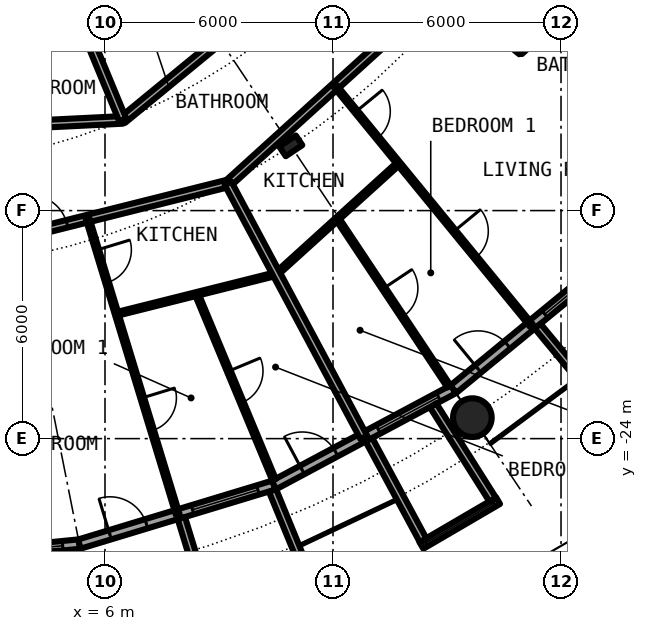
"""IFC4 building model, lengths in metres.
Left out: names, types, materials, properties, quantities, classifications, styles, units other than length and angle.
Written with IfcOpenShell. Run it as: python <this file> out.ifc"""

import sys

from ifc_helpers import new_model, si_unit, direction, frame, frame_2d, origin, origin_2d, place, context, subcontext, project, spatial, rectangle, circle, hollow_circle, i_section, extrude, element, fill, save


model = new_model("IFC4")
c1 = context("Model", 3, precision=1e-05, world=origin(), true_north=direction((0.0, 1.0)))
c2 = subcontext(c1, "Body", "Model", "MODEL_VIEW")
j1 = project(units=[si_unit("LENGTHUNIT", "METRE"), si_unit("PLANEANGLEUNIT", "RADIAN")], contexts=[c1])
p1 = place(None, origin())
s1 = spatial("IfcSite", under=j1, at=p1, CompositionType="ELEMENT")
p2 = place(p1, origin())
s2 = spatial("IfcBuilding", under=s1, at=p2, CompositionType="ELEMENT")
p3 = place(p2, frame((0.0, 0.0, 81.9)))
s3 = spatial("IfcBuildingStorey", under=s2, at=p3, CompositionType="ELEMENT", Elevation=81.9)
p4 = place(p3, frame((15.667, -23.448, 0.0), z_axis=(0.0, 0.0, 1.0), x_axis=(1.0, 0.0, 0.0)))
e1 = element("IfcColumn", 1, at=p4, inside=s3, PredefinedType="COLUMN", context=c2, shape_type="SweptSolid", body=[
    extrude(hollow_circle(Radius=0.508, WallThickness=0.04, at=origin_2d()), origin(), (0.0, 0.0, 1.0), 3.05),
])
p5 = place(p3, frame((10.889, -16.297, 0.0), z_axis=(0.0, 0.0, 1.0), x_axis=(0.55557023302, -0.831469612303, 0.0)))
e2 = element("IfcColumn", 2, at=p5, inside=s3, PredefinedType="COLUMN", context=c2, shape_type="SweptSolid", body=[
    extrude(i_section(OverallWidth=0.306, OverallDepth=0.524, WebThickness=0.021, FlangeThickness=0.04, FilletRadius=0.027, at=origin_2d()), origin(), (0.0, 0.0, 1.0), 3.05),
])
p6 = place(p3, frame((0.0, -27.3, 0.0), z_axis=(0.0, 0.0, 1.0), x_axis=(0.995173996315, 0.098126026407, 0.0)))
e3 = element("IfcWall", 3, at=p6, inside=s3, PredefinedType="SOLIDWALL", context=c2, shape_type="SweptSolid", body=[
    extrude(rectangle(XDim=5.352, YDim=0.25, at=frame_2d((2.676, 0.0))), origin(), (0.0, 0.0, 1.0), 2.7),
])
p7 = place(p6, frame((0.841, 0.0, 0.0)))
e4 = element("IfcOpeningElement", 4, at=p7, cuts=e3, PredefinedType="OPENING", context=c2, shape_type="SweptSolid", body=[
    extrude(rectangle(XDim=1.0, YDim=2.2, at=frame_2d((0.5, 1.1))), frame((0.0, 0.135, 0.0), z_axis=(0.0, -1.0, 0.0), x_axis=(1.0, 0.0, 0.0)), (0.0, 0.0, 1.0), 0.27),
])
p8 = place(p6, frame((3.111, 0.0, 0.3)))
e5 = element("IfcOpeningElement", 5, at=p8, cuts=e3, PredefinedType="OPENING", context=c2, shape_type="SweptSolid", body=[
    extrude(rectangle(XDim=1.8, YDim=2.1, at=frame_2d((0.9, 1.05))), frame((0.0, 0.135, 0.0), z_axis=(0.0, -1.0, 0.0), x_axis=(1.0, 0.0, 0.0)), (0.0, 0.0, 1.0), 0.27),
])
p9 = place(p3, frame((4.671, -26.966, -0.03), z_axis=(0.0, 0.0, 1.0), x_axis=(0.170539878907, -0.985350774954, 0.0)))
e6 = element("IfcWall", 6, at=p9, inside=s3, PredefinedType="SOLIDWALL", context=c2, shape_type="SweptSolid", body=[
    extrude(rectangle(XDim=2.932, YDim=0.2, at=frame_2d((1.466, 0.0))), origin(), (0.0, 0.0, 1.0), 2.73),
])
p10 = place(p3, frame((5.326, -26.775, 0.0), z_axis=(0.0, 0.0, 1.0), x_axis=(0.956965678721, 0.290201119486, 0.0)))
e7 = element("IfcWall", 7, at=p10, inside=s3, PredefinedType="SOLIDWALL", context=c2, shape_type="SweptSolid", body=[
    extrude(rectangle(XDim=5.351, YDim=0.25, at=frame_2d((2.676, 0.0))), origin(), (0.0, 0.0, 1.0), 2.7),
])
p11 = place(p10, frame((0.841, 0.0, 0.0)))
e8 = element("IfcOpeningElement", 8, at=p11, cuts=e7, PredefinedType="OPENING", context=c2, shape_type="SweptSolid", body=[
    extrude(rectangle(XDim=1.0, YDim=2.2, at=frame_2d((0.5, 1.1))), frame((0.0, 0.135, 0.0), z_axis=(0.0, -1.0, 0.0), x_axis=(1.0, 0.0, 0.0)), (0.0, 0.0, 1.0), 0.27),
])
p12 = place(p10, frame((3.111, 0.0, 0.3)))
e9 = element("IfcOpeningElement", 9, at=p12, cuts=e7, PredefinedType="OPENING", context=c2, shape_type="SweptSolid", body=[
    extrude(rectangle(XDim=1.8, YDim=2.1, at=frame_2d((0.9, 1.05))), frame((0.0, 0.135, 0.0), z_axis=(0.0, -1.0, 0.0), x_axis=(1.0, 0.0, 0.0)), (0.0, 0.0, 1.0), 0.27),
])
p13 = place(p3, frame((8.009, -26.092, -0.03), z_axis=(0.0, 0.0, 1.0), x_axis=(0.293406695073, -0.955987715029, 0.0)))
e10 = element("IfcWall", 10, at=p13, inside=s3, PredefinedType="SOLIDWALL", context=c2, shape_type="SweptSolid", body=[
    extrude(rectangle(XDim=3.006, YDim=0.2, at=frame_2d((1.503, 0.0))), origin(), (0.0, 0.0, 1.0), 2.73),
])
p14 = place(p3, frame((10.409, -25.364, -0.03), z_axis=(0.0, 0.0, 1.0), x_axis=(0.379509886562, -0.925187681501, 0.0)))
e11 = element("IfcWall", 11, at=p14, inside=s3, PredefinedType="SOLIDWALL", context=c2, shape_type="SweptSolid", body=[
    extrude(rectangle(XDim=2.883, YDim=0.2, at=frame_2d((1.441, 0.0))), origin(), (0.0, 0.0, 1.0), 2.73),
])
p15 = place(p3, frame((10.447, -25.222, 0.0), z_axis=(0.0, 0.0, 1.0), x_axis=(0.881915646801, 0.471407246368, 0.0)))
e12 = element("IfcWall", 12, at=p15, inside=s3, PredefinedType="SOLIDWALL", context=c2, shape_type="SweptSolid", body=[
    extrude(rectangle(XDim=5.352, YDim=0.25, at=frame_2d((2.676, 0.0))), origin(), (0.0, 0.0, 1.0), 2.7),
])
p16 = place(p15, frame((0.841, 0.0, 0.0)))
e13 = element("IfcOpeningElement", 13, at=p16, cuts=e12, PredefinedType="OPENING", context=c2, shape_type="SweptSolid", body=[
    extrude(rectangle(XDim=1.0, YDim=2.2, at=frame_2d((0.5, 1.1))), frame((0.0, 0.135, 0.0), z_axis=(0.0, -1.0, 0.0), x_axis=(1.0, 0.0, 0.0)), (0.0, 0.0, 1.0), 0.27),
])
p17 = place(p15, frame((3.111, 0.0, 0.3)))
e14 = element("IfcOpeningElement", 14, at=p17, cuts=e12, PredefinedType="OPENING", context=c2, shape_type="SweptSolid", body=[
    extrude(rectangle(XDim=1.8, YDim=2.1, at=frame_2d((0.9, 1.05))), frame((0.0, 0.135, 0.0), z_axis=(0.0, -1.0, 0.0), x_axis=(1.0, 0.0, 0.0)), (0.0, 0.0, 1.0), 0.27),
])
p18 = place(p3, frame((14.327, -26.812, -0.03), z_axis=(0.0, 0.0, 1.0), x_axis=(0.863346521872, 0.504611517081, 0.0)))
e15 = element("IfcWall", 15, at=p18, inside=s3, PredefinedType="SOLIDWALL", context=c2, shape_type="SweptSolid", body=[
    extrude(rectangle(XDim=2.336, YDim=0.2, at=frame_2d((1.168, 0.0))), origin(), (0.0, 0.0, 1.0), 2.73),
])
p19 = place(p18, frame((0.128, 0.0, 0.33)))
e16 = element("IfcOpeningElement", 16, at=p19, cuts=e15, PredefinedType="OPENING", context=c2, shape_type="SweptSolid", body=[
    extrude(circle(Radius=1.04, at=frame_2d((1.04, 1.04))), frame((0.0, 0.11, 0.0), z_axis=(0.0, -1.0, 0.0), x_axis=(1.0, 0.0, 0.0)), (0.0, 0.0, 1.0), 0.22),
])
p20 = place(p3, frame((12.945, -24.029, -0.03), z_axis=(0.0, 0.0, 1.0), x_axis=(0.474424310775, -0.88029629861, 0.0)))
e17 = element("IfcWall", 17, at=p20, inside=s3, PredefinedType="SOLIDWALL", context=c2, shape_type="SweptSolid", body=[
    extrude(rectangle(XDim=3.006, YDim=0.2, at=frame_2d((1.503, 0.0))), origin(), (0.0, 0.0, 1.0), 2.73),
])
p21 = place(p3, frame((14.635, -23.126, -0.03), z_axis=(0.0, 0.0, 1.0), x_axis=(0.534437802731, -0.845207805816, 0.0)))
e18 = element("IfcWall", 18, at=p21, inside=s3, PredefinedType="SOLIDWALL", context=c2, shape_type="SweptSolid", body=[
    extrude(rectangle(XDim=2.932, YDim=0.2, at=frame_2d((1.466, 0.0))), origin(), (0.0, 0.0, 1.0), 2.73),
])
p22 = place(p3, frame((15.167, -22.699, 0.0), z_axis=(0.0, 0.0, 1.0), x_axis=(0.773019449054, 0.634382322723, 0.0)))
e19 = element("IfcWall", 19, at=p22, inside=s3, PredefinedType="SOLIDWALL", context=c2, shape_type="SweptSolid", body=[
    extrude(rectangle(XDim=5.352, YDim=0.25, at=frame_2d((2.676, 0.0))), origin(), (0.0, 0.0, 1.0), 2.7),
])
p23 = place(p22, frame((0.841, 0.0, 0.0)))
e20 = element("IfcOpeningElement", 20, at=p23, cuts=e19, PredefinedType="OPENING", context=c2, shape_type="SweptSolid", body=[
    extrude(rectangle(XDim=1.0, YDim=2.2, at=frame_2d((0.5, 1.1))), frame((0.0, 0.135, 0.0), z_axis=(0.0, -1.0, 0.0), x_axis=(1.0, 0.0, 0.0)), (0.0, 0.0, 1.0), 0.27),
])
p24 = place(p22, frame((3.111, 0.0, 0.3)))
e21 = element("IfcOpeningElement", 21, at=p24, cuts=e19, PredefinedType="OPENING", context=c2, shape_type="SweptSolid", body=[
    extrude(rectangle(XDim=1.8, YDim=2.1, at=frame_2d((0.9, 1.05))), frame((0.0, 0.135, 0.0), z_axis=(0.0, -1.0, 0.0), x_axis=(1.0, 0.0, 0.0)), (0.0, 0.0, 1.0), 0.27),
])
p25 = place(p3, frame((17.384, -21.041, -0.03), z_axis=(0.0, 0.0, 1.0), x_axis=(0.63709551667, -0.770784861449, 0.0)))
e22 = element("IfcWall", 22, at=p25, inside=s3, PredefinedType="SOLIDWALL", context=c2, shape_type="SweptSolid", body=[
    extrude(rectangle(XDim=3.006, YDim=0.2, at=frame_2d((1.503, 0.0))), origin(), (0.0, 0.0, 1.0), 2.73),
])
p26 = place(p3, frame((6.303, -20.721, 0.0), z_axis=(0.0, 0.0, 1.0), x_axis=(0.97005315629, 0.242892721118, 0.0)))
e23 = element("IfcWall", 23, at=p26, inside=s3, PredefinedType="PARTITIONING", context=c2, shape_type="SweptSolid", body=[
    extrude(rectangle(XDim=4.343, YDim=0.1, at=frame_2d((2.172, 0.0))), origin(), (0.0, 0.0, 1.0), 2.7),
])
p27 = place(p3, frame((10.513, -19.668, 0.0), z_axis=(0.0, 0.0, 1.0), x_axis=(0.74092137325, 0.671591779775, 0.0)))
e24 = element("IfcWall", 24, at=p27, inside=s3, PredefinedType="PARTITIONING", context=c2, shape_type="SweptSolid", body=[
    extrude(rectangle(XDim=4.342, YDim=0.1, at=frame_2d((2.171, 0.0))), origin(), (0.0, 0.0, 1.0), 2.7),
])
p28 = place(p3, frame((16.936, -13.845, 0.0), z_axis=(0.0, 0.0, 1.0), x_axis=(0.740836325503, 0.671685595212, 0.0)))
e25 = element("IfcWall", 25, at=p28, inside=s3, PredefinedType="PARTITIONING", context=c2, shape_type="SweptSolid", body=[
    extrude(rectangle(XDim=2.168, YDim=0.1, at=frame_2d((1.084, 0.0))), origin(), (0.0, 0.0, 1.0), 2.7),
])
p29 = place(p3, frame((0.0, -19.6, 0.0), z_axis=(0.0, 0.0, 1.0), x_axis=(0.970002158938, 0.243096301198, 0.0)))
e26 = element("IfcWall", 26, at=p29, inside=s3, PredefinedType="PARTITIONING", context=c2, shape_type="SweptSolid", body=[
    extrude(rectangle(XDim=9.528, YDim=0.2, at=frame_2d((4.764, 0.0))), origin(), (0.0, 0.0, 1.0), 2.38),
])
p30 = place(p29, frame((4.155, 0.0, 0.0)))
e27 = element("IfcOpeningElement", 27, at=p30, cuts=e26, PredefinedType="OPENING", context=c2, shape_type="SweptSolid", body=[
    extrude(rectangle(XDim=1.0, YDim=2.3, at=frame_2d((0.5, 1.15))), frame((0.0, 0.11, 0.0), z_axis=(0.0, -1.0, 0.0), x_axis=(1.0, 0.0, 0.0)), (0.0, 0.0, 1.0), 0.22),
])
p31 = place(p3, frame((9.239, -17.286, 0.0), z_axis=(0.0, 0.0, 1.0), x_axis=(0.740909940942, 0.671604392044, 0.0)))
e28 = element("IfcWall", 28, at=p31, inside=s3, PredefinedType="PARTITIONING", context=c2, shape_type="SweptSolid", body=[
    extrude(rectangle(XDim=9.367, YDim=0.2, at=frame_2d((4.683, 0.0))), origin(), (0.0, 0.0, 1.0), 2.38),
])
p32 = place(p31, frame((5.215, 0.0, 0.0)))
e29 = element("IfcOpeningElement", 29, at=p32, cuts=e28, PredefinedType="OPENING", context=c2, shape_type="SweptSolid", body=[
    extrude(rectangle(XDim=1.0, YDim=2.3, at=frame_2d((0.5, 1.15))), frame((0.0, 0.11, 0.0), z_axis=(0.0, -1.0, 0.0), x_axis=(1.0, 0.0, 0.0)), (0.0, 0.0, 1.0), 0.22),
])
p33 = place(p3, frame((6.467, -15.614, 0.0), z_axis=(0.0, 0.0, 1.0), x_axis=(0.773074935257, 0.634314704605, 0.0)))
e30 = element("IfcWall", 30, at=p33, inside=s3, PredefinedType="PARTITIONING", context=c2, shape_type="SweptSolid", body=[
    extrude(rectangle(XDim=9.809, YDim=0.2, at=frame_2d((4.904, 0.0))), origin(), (0.0, 0.0, 1.0), 2.7),
])
p34 = place(p33, frame((4.407, 0.0, 0.0)))
e31 = element("IfcOpeningElement", 31, at=p34, cuts=e30, PredefinedType="OPENING", context=c2, shape_type="SweptSolid", body=[
    extrude(rectangle(XDim=1.0, YDim=2.3, at=frame_2d((0.5, 1.15))), frame((0.0, 0.11, 0.0), z_axis=(0.0, -1.0, 0.0), x_axis=(1.0, 0.0, 0.0)), (0.0, 0.0, 1.0), 0.22),
])
p35 = place(p3, frame((-4.906, -16.172, 0.0), z_axis=(0.0, 0.0, 1.0), x_axis=(0.998798520108, 0.049005267363, 0.0)))
e32 = element("IfcWall", 32, at=p35, inside=s3, PredefinedType="PARTITIONING", context=c2, shape_type="SweptSolid", body=[
    extrude(rectangle(XDim=11.389, YDim=0.2, at=frame_2d((5.694, 0.0))), origin(), (0.0, 0.0, 1.0), 2.7),
])
p36 = place(p35, frame((6.008, 0.0, 0.0)))
e33 = element("IfcOpeningElement", 33, at=p36, cuts=e32, PredefinedType="OPENING", context=c2, shape_type="SweptSolid", body=[
    extrude(rectangle(XDim=1.0, YDim=2.3, at=frame_2d((0.5, 1.15))), frame((0.0, 0.11, 0.0), z_axis=(0.0, -1.0, 0.0), x_axis=(1.0, 0.0, 0.0)), (0.0, 0.0, 1.0), 0.22),
])
p37 = place(p3, frame((2.954, -7.132, 0.0), z_axis=(0.0, 0.0, 1.0), x_axis=(0.382646942224, -0.923894646378, 0.0)))
e34 = element("IfcWall", 34, at=p37, inside=s3, PredefinedType="PARTITIONING", context=c2, shape_type="SweptSolid", body=[
    extrude(rectangle(XDim=9.181, YDim=0.2, at=frame_2d((4.59, 0.0))), origin(), (0.0, 0.0, 1.0), 2.7),
])
p38 = place(p3, frame((5.543, -18.211, 0.0), z_axis=(0.0, 0.0, 1.0), x_axis=(0.291319167605, -0.956625915698, 0.0)))
e35 = element("IfcWall", 35, at=p38, inside=s3, PredefinedType="PARTITIONING", context=c2, shape_type="SweptSolid", body=[
    extrude(rectangle(XDim=8.139, YDim=0.1, at=frame_2d((4.07, 0.0))), origin(), (0.0, 0.0, 1.0), 2.7),
])
p39 = place(p38, frame((0.862, 0.0, 0.0)))
e36 = element("IfcOpeningElement", 36, at=p39, cuts=e35, PredefinedType="OPENING", context=c2, shape_type="SweptSolid", body=[
    extrude(rectangle(XDim=0.9, YDim=2.3, at=frame_2d((0.45, 1.15))), frame((0.0, 0.06, 0.0), z_axis=(0.0, -1.0, 0.0), x_axis=(1.0, 0.0, 0.0)), (0.0, 0.0, 1.0), 0.12),
])
p40 = place(p38, frame((4.931, 0.0, 0.0)))
e37 = element("IfcOpeningElement", 37, at=p40, cuts=e35, PredefinedType="OPENING", context=c2, shape_type="SweptSolid", body=[
    extrude(rectangle(XDim=0.9, YDim=2.3, at=frame_2d((0.45, 1.15))), frame((0.0, 0.06, 0.0), z_axis=(0.0, -1.0, 0.0), x_axis=(1.0, 0.0, 0.0)), (0.0, 0.0, 1.0), 0.12),
])
p41 = place(p3, frame((8.412, -20.192, 0.0), z_axis=(0.0, 0.0, 1.0), x_axis=(0.384464934183, -0.923139596369, 0.0)))
e38 = element("IfcWall", 38, at=p41, inside=s3, PredefinedType="PARTITIONING", context=c2, shape_type="SweptSolid", body=[
    extrude(rectangle(XDim=5.301, YDim=0.1, at=frame_2d((2.65, 0.0))), origin(), (0.0, 0.0, 1.0), 2.7),
])
p42 = place(p41, frame((2.2, 0.0, 0.0)))
e39 = element("IfcOpeningElement", 39, at=p42, cuts=e38, PredefinedType="OPENING", context=c2, shape_type="SweptSolid", body=[
    extrude(rectangle(XDim=0.9, YDim=2.3, at=frame_2d((0.45, 1.15))), frame((0.0, 0.06, 0.0), z_axis=(0.0, -1.0, 0.0), x_axis=(1.0, 0.0, 0.0)), (0.0, 0.0, 1.0), 0.12),
])
p43 = place(p3, frame((9.239, -17.286, 0.0), z_axis=(0.0, 0.0, 1.0), x_axis=(0.471439510802, -0.881898399848, 0.0)))
e40 = element("IfcWall", 40, at=p43, inside=s3, PredefinedType="PARTITIONING", context=c2, shape_type="SweptSolid", body=[
    extrude(rectangle(XDim=7.575, YDim=0.2, at=frame_2d((3.787, 0.0))), origin(), (0.0, 0.0, 1.0), 2.7),
])
p44 = place(p3, frame((12.062, -14.727, 0.0), z_axis=(0.0, 0.0, 1.0), x_axis=(0.633664062855, -0.773608334654, 0.0)))
e41 = element("IfcWall", 41, at=p44, inside=s3, PredefinedType="PARTITIONING", context=c2, shape_type="SweptSolid", body=[
    extrude(rectangle(XDim=8.138, YDim=0.1, at=frame_2d((4.069, 0.0))), origin(), (0.0, 0.0, 1.0), 2.7),
])
p45 = place(p44, frame((0.861, 0.0, 0.0)))
e42 = element("IfcOpeningElement", 42, at=p45, cuts=e41, PredefinedType="OPENING", context=c2, shape_type="SweptSolid", body=[
    extrude(rectangle(XDim=0.9, YDim=2.3, at=frame_2d((0.45, 1.15))), frame((0.0, 0.06, 0.0), z_axis=(0.0, -1.0, 0.0), x_axis=(1.0, 0.0, 0.0)), (0.0, 0.0, 1.0), 0.12),
])
p46 = place(p44, frame((4.931, 0.0, 0.0)))
e43 = element("IfcOpeningElement", 43, at=p46, cuts=e41, PredefinedType="OPENING", context=c2, shape_type="SweptSolid", body=[
    extrude(rectangle(XDim=0.9, YDim=2.3, at=frame_2d((0.45, 1.15))), frame((0.0, 0.06, 0.0), z_axis=(0.0, -1.0, 0.0), x_axis=(1.0, 0.0, 0.0)), (0.0, 0.0, 1.0), 0.12),
])
p47 = place(p3, frame((12.115, -18.213, 0.0), z_axis=(0.0, 0.0, 1.0), x_axis=(0.553913391217, -0.832574294, 0.0)))
e44 = element("IfcWall", 44, at=p47, inside=s3, PredefinedType="PARTITIONING", context=c2, shape_type="SweptSolid", body=[
    extrude(rectangle(XDim=5.301, YDim=0.1, at=frame_2d((2.65, 0.0))), origin(), (0.0, 0.0, 1.0), 2.7),
])
p48 = place(p47, frame((2.2, 0.0, 0.0)))
e45 = element("IfcOpeningElement", 45, at=p48, cuts=e44, PredefinedType="OPENING", context=c2, shape_type="SweptSolid", body=[
    extrude(rectangle(XDim=0.9, YDim=2.3, at=frame_2d((0.45, 1.15))), frame((0.0, 0.06, 0.0), z_axis=(0.0, -1.0, 0.0), x_axis=(1.0, 0.0, 0.0)), (0.0, 0.0, 1.0), 0.12),
])
p49 = place(p3, frame((14.882, -12.171, 0.0), z_axis=(0.0, 0.0, 1.0), x_axis=(0.774162545943, -0.632986850147, 0.0)))
e46 = element("IfcWall", 46, at=p49, inside=s3, PredefinedType="PARTITIONING", context=c2, shape_type="SweptSolid", body=[
    extrude(rectangle(XDim=2.649, YDim=0.1, at=frame_2d((1.325, 0.0))), origin(), (0.0, 0.0, 1.0), 2.7),
])
p50 = place(p49, frame((0.875, 0.0, 0.0)))
e47 = element("IfcOpeningElement", 47, at=p50, cuts=e46, PredefinedType="OPENING", context=c2, shape_type="SweptSolid", body=[
    extrude(rectangle(XDim=0.9, YDim=2.3, at=frame_2d((0.45, 1.15))), frame((0.0, 0.06, 0.0), z_axis=(0.0, -1.0, 0.0), x_axis=(1.0, 0.0, 0.0)), (0.0, 0.0, 1.0), 0.12),
])
p51 = place(p3, frame((16.515, -11.035, 0.0), z_axis=(0.0, 0.0, 1.0), x_axis=(0.831505405283, -0.555516661303, 0.0)))
e48 = element("IfcWall", 48, at=p51, inside=s3, PredefinedType="PARTITIONING", context=c2, shape_type="SweptSolid", body=[
    extrude(rectangle(XDim=7.312, YDim=0.2, at=frame_2d((3.656, 0.0))), origin(), (0.0, 0.0, 1.0), 2.7),
])
p52 = place(p8, origin())
e49 = element("IfcWindow", 49, at=p52, inside=s3, PartitioningType="SINGLE_PANEL", PredefinedType="WINDOW", context=c2, shape_type="SweptSolid", body=[
    extrude(rectangle(XDim=1.8, YDim=2.1, at=frame_2d((0.9, 1.05))), frame((0.0, 0.03, 0.0), z_axis=(0.0, -1.0, 0.0), x_axis=(1.0, 0.0, 0.0)), (0.0, 0.0, 1.0), 0.06),
])
fill(e5, e49)
p53 = place(p11, origin())
e50 = element("IfcDoor", 50, at=p53, inside=s3, OperationType="SINGLE_SWING_LEFT", PredefinedType="DOOR", context=c2, shape_type="SweptSolid", body=[
    extrude(rectangle(XDim=1.0, YDim=2.2, at=frame_2d((0.5, 1.1))), frame((0.0, 0.025, 0.0), z_axis=(0.0, -1.0, 0.0), x_axis=(1.0, 0.0, 0.0)), (0.0, 0.0, 1.0), 0.05),
])
fill(e8, e50)
p54 = place(p12, origin())
e51 = element("IfcWindow", 51, at=p54, inside=s3, PartitioningType="SINGLE_PANEL", PredefinedType="WINDOW", context=c2, shape_type="SweptSolid", body=[
    extrude(rectangle(XDim=1.8, YDim=2.1, at=frame_2d((0.9, 1.05))), frame((0.0, 0.03, 0.0), z_axis=(0.0, -1.0, 0.0), x_axis=(1.0, 0.0, 0.0)), (0.0, 0.0, 1.0), 0.06),
])
fill(e9, e51)
p55 = place(p16, origin())
e52 = element("IfcDoor", 52, at=p55, inside=s3, OperationType="SINGLE_SWING_LEFT", PredefinedType="DOOR", context=c2, shape_type="SweptSolid", body=[
    extrude(rectangle(XDim=1.0, YDim=2.2, at=frame_2d((0.5, 1.1))), frame((0.0, 0.025, 0.0), z_axis=(0.0, -1.0, 0.0), x_axis=(1.0, 0.0, 0.0)), (0.0, 0.0, 1.0), 0.05),
])
fill(e13, e52)
p56 = place(p17, origin())
e53 = element("IfcWindow", 53, at=p56, inside=s3, PartitioningType="SINGLE_PANEL", PredefinedType="WINDOW", context=c2, shape_type="SweptSolid", body=[
    extrude(rectangle(XDim=1.8, YDim=2.1, at=frame_2d((0.9, 1.05))), frame((0.0, 0.03, 0.0), z_axis=(0.0, -1.0, 0.0), x_axis=(1.0, 0.0, 0.0)), (0.0, 0.0, 1.0), 0.06),
])
fill(e14, e53)
p57 = place(p19, origin())
e54 = element("IfcWindow", 54, at=p57, inside=s3, PartitioningType="SINGLE_PANEL", PredefinedType="WINDOW", context=c2, shape_type="SweptSolid", body=[
    extrude(circle(Radius=1.04, at=frame_2d((1.04, 1.04))), frame((0.0, 0.03, 0.0), z_axis=(0.0, -1.0, 0.0), x_axis=(1.0, 0.0, 0.0)), (0.0, 0.0, 1.0), 0.06),
])
fill(e16, e54)
p58 = place(p23, origin())
e55 = element("IfcDoor", 55, at=p58, inside=s3, OperationType="SINGLE_SWING_LEFT", PredefinedType="DOOR", context=c2, shape_type="SweptSolid", body=[
    extrude(rectangle(XDim=1.0, YDim=2.2, at=frame_2d((0.5, 1.1))), frame((0.0, 0.025, 0.0), z_axis=(0.0, -1.0, 0.0), x_axis=(1.0, 0.0, 0.0)), (0.0, 0.0, 1.0), 0.05),
])
fill(e20, e55)
p59 = place(p24, origin())
e56 = element("IfcWindow", 56, at=p59, inside=s3, PartitioningType="SINGLE_PANEL", PredefinedType="WINDOW", context=c2, shape_type="SweptSolid", body=[
    extrude(rectangle(XDim=1.8, YDim=2.1, at=frame_2d((0.9, 1.05))), frame((0.0, 0.03, 0.0), z_axis=(0.0, -1.0, 0.0), x_axis=(1.0, 0.0, 0.0)), (0.0, 0.0, 1.0), 0.06),
])
fill(e21, e56)
p60 = place(p30, origin())
e57 = element("IfcDoor", 57, at=p60, inside=s3, OperationType="SINGLE_SWING_LEFT", PredefinedType="DOOR", context=c2, shape_type="SweptSolid", body=[
    extrude(rectangle(XDim=1.0, YDim=2.3, at=frame_2d((0.5, 1.15))), frame((0.0, 0.025, 0.0), z_axis=(0.0, -1.0, 0.0), x_axis=(1.0, 0.0, 0.0)), (0.0, 0.0, 1.0), 0.05),
])
fill(e27, e57)
p61 = place(p39, origin())
e58 = element("IfcDoor", 58, at=p61, inside=s3, OperationType="SINGLE_SWING_LEFT", PredefinedType="DOOR", context=c2, shape_type="SweptSolid", body=[
    extrude(rectangle(XDim=0.9, YDim=2.3, at=frame_2d((0.45, 1.15))), frame((0.0, 0.025, 0.0), z_axis=(0.0, -1.0, 0.0), x_axis=(1.0, 0.0, 0.0)), (0.0, 0.0, 1.0), 0.05),
])
fill(e36, e58)
p62 = place(p40, origin())
e59 = element("IfcDoor", 59, at=p62, inside=s3, OperationType="SINGLE_SWING_RIGHT", PredefinedType="DOOR", context=c2, shape_type="SweptSolid", body=[
    extrude(rectangle(XDim=0.9, YDim=2.3, at=frame_2d((0.45, 1.15))), frame((0.0, 0.025, 0.0), z_axis=(0.0, -1.0, 0.0), x_axis=(1.0, 0.0, 0.0)), (0.0, 0.0, 1.0), 0.05),
])
fill(e37, e59)
p63 = place(p42, origin())
e60 = element("IfcDoor", 60, at=p63, inside=s3, OperationType="SINGLE_SWING_LEFT", PredefinedType="DOOR", context=c2, shape_type="SweptSolid", body=[
    extrude(rectangle(XDim=0.9, YDim=2.3, at=frame_2d((0.45, 1.15))), frame((0.0, 0.025, 0.0), z_axis=(0.0, -1.0, 0.0), x_axis=(1.0, 0.0, 0.0)), (0.0, 0.0, 1.0), 0.05),
])
fill(e39, e60)
p64 = place(p45, origin())
e61 = element("IfcDoor", 61, at=p64, inside=s3, OperationType="SINGLE_SWING_LEFT", PredefinedType="DOOR", context=c2, shape_type="SweptSolid", body=[
    extrude(rectangle(XDim=0.9, YDim=2.3, at=frame_2d((0.45, 1.15))), frame((0.0, 0.025, 0.0), z_axis=(0.0, -1.0, 0.0), x_axis=(1.0, 0.0, 0.0)), (0.0, 0.0, 1.0), 0.05),
])
fill(e42, e61)
p65 = place(p46, origin())
e62 = element("IfcDoor", 62, at=p65, inside=s3, OperationType="SINGLE_SWING_RIGHT", PredefinedType="DOOR", context=c2, shape_type="SweptSolid", body=[
    extrude(rectangle(XDim=0.9, YDim=2.3, at=frame_2d((0.45, 1.15))), frame((0.0, 0.025, 0.0), z_axis=(0.0, -1.0, 0.0), x_axis=(1.0, 0.0, 0.0)), (0.0, 0.0, 1.0), 0.05),
])
fill(e43, e62)
p66 = place(p48, origin())
e63 = element("IfcDoor", 63, at=p66, inside=s3, OperationType="SINGLE_SWING_LEFT", PredefinedType="DOOR", context=c2, shape_type="SweptSolid", body=[
    extrude(rectangle(XDim=0.9, YDim=2.3, at=frame_2d((0.45, 1.15))), frame((0.0, 0.025, 0.0), z_axis=(0.0, -1.0, 0.0), x_axis=(1.0, 0.0, 0.0)), (0.0, 0.0, 1.0), 0.05),
])
fill(e45, e63)
save(model, sys.argv[1])
